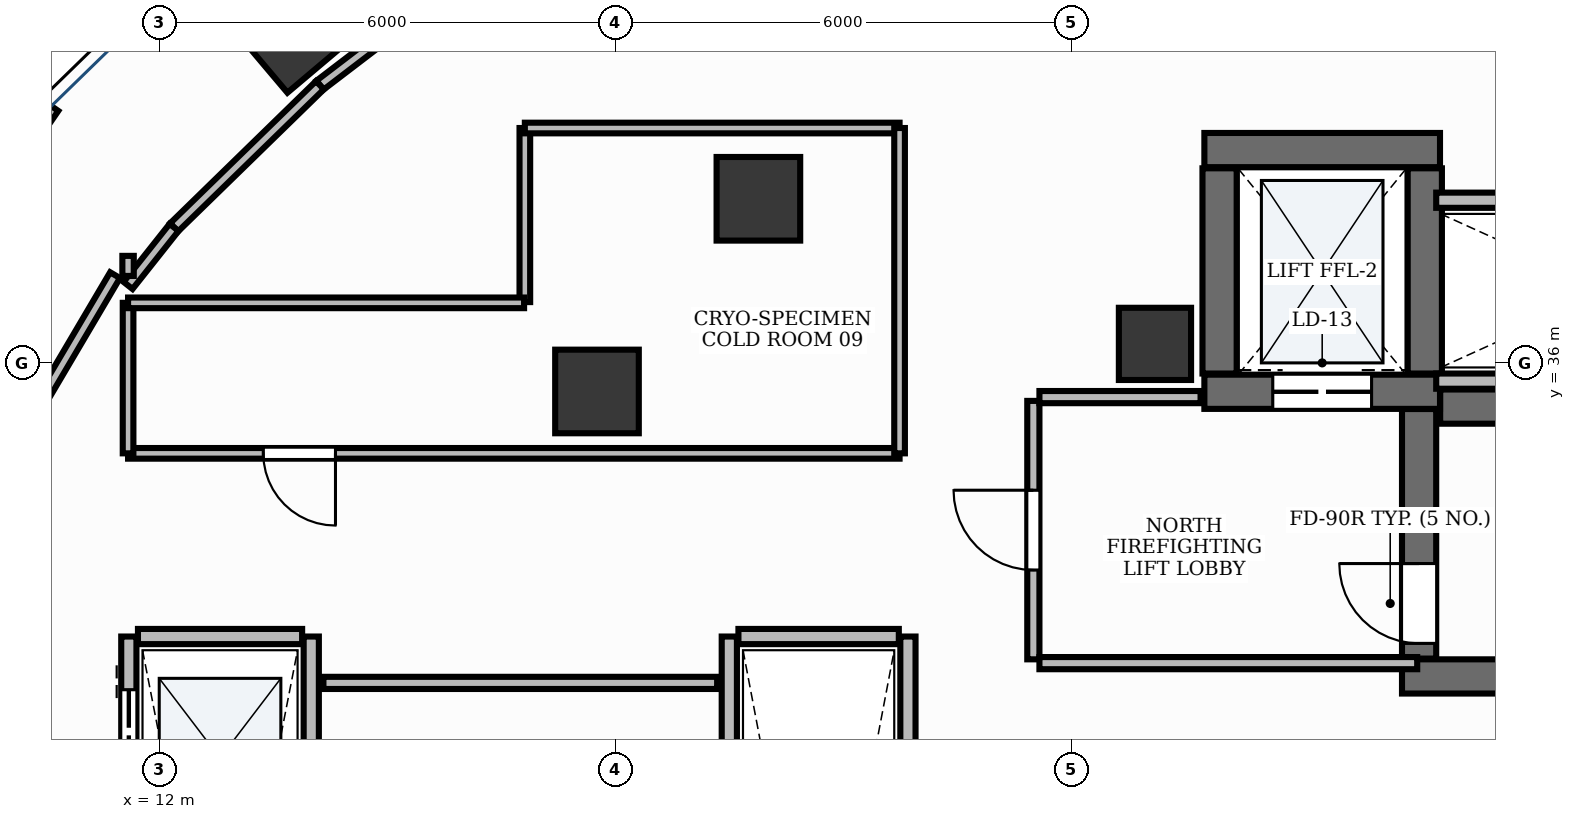
"""IFC4 building model, lengths in metres.
Left out: names, types, materials, properties, quantities, classifications, styles, units other than length and angle.
Written with IfcOpenShell. Run it as: python <this file> out.ifc"""

import sys

from ifc_helpers import new_model, si_unit, direction, frame, frame_2d, origin, origin_2d, place, context, subcontext, project, spatial, rectangle, extrude, element, fill, save


model = new_model("IFC4")
c1 = context("Model", 3, precision=1e-05, world=origin(), true_north=direction((0.0, 1.0)))
c2 = subcontext(c1, "Body", "Model", "MODEL_VIEW")
j1 = project(units=[si_unit("LENGTHUNIT", "METRE"), si_unit("PLANEANGLEUNIT", "RADIAN")], contexts=[c1])
p1 = place(None, origin())
s1 = spatial("IfcSite", under=j1, at=p1, CompositionType="ELEMENT")
p2 = place(p1, origin())
s2 = spatial("IfcBuilding", under=s1, at=p2, CompositionType="ELEMENT")
p3 = place(p2, frame((0.0, 0.0, 102.6)))
s3 = spatial("IfcBuildingStorey", under=s2, at=p3, CompositionType="ELEMENT", Elevation=102.6)
p4 = place(p3, frame((28.852, 35.425, 0.0), z_axis=(0.0, 0.0, 1.0), x_axis=(1.0, 0.0, 0.0)))
e1 = element("IfcWall", 1, at=p4, inside=s3, PredefinedType="SHEAR", context=c2, shape_type="SweptSolid", body=[
    extrude(rectangle(XDim=8.248, YDim=0.45, at=frame_2d((4.124, 0.0))), origin(), (0.0, 0.0, 1.0), 3.9),
])
p5 = place(p3, frame((28.35, 31.875, 0.0), z_axis=(0.0, 0.0, 1.0), x_axis=(1.0, 0.0, 0.0)))
e2 = element("IfcWall", 2, at=p5, inside=s3, PredefinedType="SHEAR", context=c2, shape_type="SweptSolid", body=[
    extrude(rectangle(XDim=8.75, YDim=0.45, at=frame_2d((4.375, 0.0))), origin(), (0.0, 0.0, 1.0), 3.9),
])
p6 = place(p3, frame((28.575, 32.11, 0.0), z_axis=(0.0, 0.0, 1.0), x_axis=(0.0, 1.0, 0.0)))
e3 = element("IfcWall", 3, at=p6, inside=s3, PredefinedType="SHEAR", context=c2, shape_type="SweptSolid", body=[
    extrude(rectangle(XDim=3.283, YDim=0.45, at=frame_2d((1.642, 0.0))), origin(), (0.0, 0.0, 1.0), 3.9),
])
p7 = place(p6, frame((0.2, 0.0, 0.0)))
e4 = element("IfcOpeningElement", 4, at=p7, cuts=e3, PredefinedType="OPENING", context=c2, shape_type="SweptSolid", body=[
    extrude(rectangle(XDim=1.05, YDim=2.15, at=frame_2d((0.525, 1.075))), frame((0.0, 0.24, 0.0), z_axis=(0.0, -1.0, 0.0), x_axis=(1.0, 0.0, 0.0)), (0.0, 0.0, 1.0), 0.48),
])
p8 = place(p3, frame((25.75, 38.8, 0.0), z_axis=(0.0, 0.0, 1.0), x_axis=(1.0, 0.0, 0.0)))
e5 = element("IfcWall", 5, at=p8, inside=s3, PredefinedType="SHEAR", context=c2, shape_type="SweptSolid", body=[
    extrude(rectangle(XDim=3.1, YDim=0.45, at=frame_2d((1.55, 0.0))), origin(), (0.0, 0.0, 1.0), 3.9),
])
p9 = place(p3, frame((25.75, 35.62, 0.0), z_axis=(0.0, 0.0, 1.0), x_axis=(1.0, 0.0, 0.0)))
e6 = element("IfcWall", 6, at=p9, inside=s3, PredefinedType="SHEAR", context=c2, shape_type="SweptSolid", body=[
    extrude(rectangle(XDim=3.1, YDim=0.45, at=frame_2d((1.55, 0.0))), origin(), (0.0, 0.0, 1.0), 3.9),
])
p10 = place(p9, frame((0.9, 0.0, 0.0)))
e7 = element("IfcOpeningElement", 7, at=p10, cuts=e6, PredefinedType="OPENING", context=c2, shape_type="SweptSolid", body=[
    extrude(rectangle(XDim=1.3, YDim=2.2, at=frame_2d((0.65, 1.1))), frame((0.0, 0.24, 0.0), z_axis=(0.0, -1.0, 0.0), x_axis=(1.0, 0.0, 0.0)), (0.0, 0.0, 1.0), 0.48),
])
for number, where, z_axis, x_axis in (
    (8, (25.95, 35.86, 0.0), (0.0, 0.0, 1.0), (0.0, 1.0, 0.0)),
    (9, (28.65, 35.86, 0.0), (0.0, 0.0, 1.0), (0.0, 1.0, 0.0)),
):
    element("IfcWall", number, at=place(p3, frame(where, z_axis=z_axis, x_axis=x_axis)), inside=s3, PredefinedType="SHEAR", context=c2, shape_type="SweptSolid", body=[
        extrude(rectangle(XDim=2.7, YDim=0.45, at=frame_2d((1.35, 0.0))), origin(), (0.0, 0.0, 1.0), 3.9),
    ])
p11 = place(p3, frame((25.1, 36.25, -0.0), z_axis=(0.0, 0.0, 1.0), x_axis=(1.0, 0.0, 0.0)))
e10 = element("IfcColumn", 10, at=p11, inside=s3, PredefinedType="PILASTER", context=c2, shape_type="SweptSolid", body=[
    extrude(rectangle(XDim=0.95, YDim=0.95, at=origin_2d()), origin(), (0.0, 0.0, 1.0), 3.901),
])
p12 = place(p3, frame((13.758, 40.4, -0.0), z_axis=(0.0, 0.0, 1.0), x_axis=(0.764246456939, 0.644924300253, 0.0)))
e11 = element("IfcColumn", 11, at=p12, inside=s3, PredefinedType="COLUMN", context=c2, shape_type="SweptSolid", body=[
    extrude(rectangle(XDim=1.2, YDim=1.2, at=origin_2d()), origin(), (0.0, 0.0, 1.0), 3.901),
])
for number, where, z_axis, x_axis in (
    (12, (19.883, 38.159, -0.0), (0.0, 0.0, 1.0), (1.0, 0.0, 0.0)),
    (13, (17.759, 35.624, -0.0), (0.0, 0.0, 1.0), (1.0, 0.0, 0.0)),
):
    element("IfcColumn", number, at=place(p3, frame(where, z_axis=z_axis, x_axis=x_axis)), inside=s3, PredefinedType="COLUMN", context=c2, shape_type="SweptSolid", body=[
        extrude(rectangle(XDim=1.1, YDim=1.1, at=origin_2d()), origin(), (0.0, 0.0, 1.0), 3.901),
    ])
p13 = place(p3, frame((10.548, 39.4, 0.0), z_axis=(0.0, 0.0, 1.0), x_axis=(-0.566825798999, -0.823837674296, 0.0)))
e14 = element("IfcWall", 14, at=p13, inside=s3, PredefinedType="STANDARD", context=c2, shape_type="SweptSolid", body=[
    extrude(rectangle(XDim=5.826, YDim=0.3, at=frame_2d((2.913, 0.0))), origin(), (0.0, 0.0, 1.0), 3.9),
])
p14 = place(p3, frame((11.6, 21.6, 0.0), z_axis=(0.0, 0.0, 1.0), x_axis=(0.0, 1.0, 0.0)))
e15 = element("IfcWall", 15, at=p14, inside=s3, PredefinedType="PARTITIONING", context=c2, shape_type="SweptSolid", body=[
    extrude(rectangle(XDim=10.8, YDim=0.2, at=frame_2d((5.4, 0.0))), origin(), (0.0, 0.0, 1.0), 2.91),
])
p15 = place(p14, frame((0.9, 0.0, 0.0)))
e16 = element("IfcOpeningElement", 16, at=p15, cuts=e15, PredefinedType="OPENING", context=c2, shape_type="SweptSolid", body=[
    extrude(rectangle(XDim=1.1, YDim=2.2, at=frame_2d((0.55, 1.1))), frame((0.0, 0.115, 0.0), z_axis=(0.0, -1.0, 0.0), x_axis=(1.0, 0.0, 0.0)), (0.0, 0.0, 1.0), 0.23),
])
p16 = place(p14, frame((3.6, 0.0, 0.0)))
e17 = element("IfcOpeningElement", 17, at=p16, cuts=e15, PredefinedType="OPENING", context=c2, shape_type="SweptSolid", body=[
    extrude(rectangle(XDim=1.1, YDim=2.2, at=frame_2d((0.55, 1.1))), frame((0.0, 0.115, 0.0), z_axis=(0.0, -1.0, 0.0), x_axis=(1.0, 0.0, 0.0)), (0.0, 0.0, 1.0), 0.23),
])
p17 = place(p14, frame((6.3, 0.0, 0.0)))
e18 = element("IfcOpeningElement", 18, at=p17, cuts=e15, PredefinedType="OPENING", context=c2, shape_type="SweptSolid", body=[
    extrude(rectangle(XDim=1.1, YDim=2.2, at=frame_2d((0.55, 1.1))), frame((0.0, 0.115, 0.0), z_axis=(0.0, -1.0, 0.0), x_axis=(1.0, 0.0, 0.0)), (0.0, 0.0, 1.0), 0.23),
])
p18 = place(p14, frame((9.0, 0.0, 0.0)))
e19 = element("IfcOpeningElement", 19, at=p18, cuts=e15, PredefinedType="OPENING", context=c2, shape_type="SweptSolid", body=[
    extrude(rectangle(XDim=1.1, YDim=2.2, at=frame_2d((0.55, 1.1))), frame((0.0, 0.115, 0.0), z_axis=(0.0, -1.0, 0.0), x_axis=(1.0, 0.0, 0.0)), (0.0, 0.0, 1.0), 0.23),
])
p19 = place(p3, frame((14.0, 21.6, 0.0), z_axis=(0.0, 0.0, 1.0), x_axis=(0.0, 1.0, 0.0)))
e20 = element("IfcWall", 20, at=p19, inside=s3, PredefinedType="PARTITIONING", context=c2, shape_type="SweptSolid", body=[
    extrude(rectangle(XDim=10.8, YDim=0.2, at=frame_2d((5.4, 0.0))), origin(), (0.0, 0.0, 1.0), 2.91),
])
p20 = place(p3, frame((11.72, 32.4, 0.0), z_axis=(0.0, 0.0, 1.0), x_axis=(1.0, 0.0, 0.0)))
e21 = element("IfcWall", 21, at=p20, inside=s3, PredefinedType="PARTITIONING", context=c2, shape_type="SweptSolid", body=[
    extrude(rectangle(XDim=2.16, YDim=0.2, at=frame_2d((1.08, 0.0))), origin(), (0.0, 0.0, 1.0), 2.91),
])
for number, where, z_axis, x_axis in (
    (22, (19.5, 21.6, 0.0), (0.0, 0.0, 1.0), (0.0, 1.0, 0.0)),
    (23, (21.85, 21.6, 0.0), (0.0, 0.0, 1.0), (0.0, 1.0, 0.0)),
):
    element("IfcWall", number, at=place(p3, frame(where, z_axis=z_axis, x_axis=x_axis)), inside=s3, PredefinedType="PARTITIONING", context=c2, shape_type="SweptSolid", body=[
        extrude(rectangle(XDim=10.8, YDim=0.2, at=frame_2d((5.4, 0.0))), origin(), (0.0, 0.0, 1.0), 2.91),
    ])
p21 = place(p3, frame((19.62, 32.4, 0.0), z_axis=(0.0, 0.0, 1.0), x_axis=(1.0, 0.0, 0.0)))
e24 = element("IfcWall", 24, at=p21, inside=s3, PredefinedType="PARTITIONING", context=c2, shape_type="SweptSolid", body=[
    extrude(rectangle(XDim=2.11, YDim=0.2, at=frame_2d((1.055, 0.0))), origin(), (0.0, 0.0, 1.0), 2.91),
])
for number, where, z_axis, x_axis in (
    (25, (28.8, 35.76, 0.0), (0.0, 0.0, 1.0), (1.0, 0.0, 0.0)),
    (26, (28.8, 38.14, 0.0), (0.0, 0.0, 1.0), (1.0, 0.0, 0.0)),
):
    element("IfcWall", number, at=place(p3, frame(where, z_axis=z_axis, x_axis=x_axis)), inside=s3, PredefinedType="PARTITIONING", context=c2, shape_type="SweptSolid", body=[
        extrude(rectangle(XDim=4.57, YDim=0.2, at=frame_2d((2.285, 0.0))), origin(), (0.0, 0.0, 1.0), 2.91),
    ])
p22 = place(p3, frame((23.5, 32.1, 0.0), z_axis=(0.0, 0.0, 1.0), x_axis=(0.0, 1.0, 0.0)))
e27 = element("IfcWall", 27, at=p22, inside=s3, PredefinedType="PARTITIONING", context=c2, shape_type="SweptSolid", body=[
    extrude(rectangle(XDim=3.4, YDim=0.16, at=frame_2d((1.7, 0.0))), origin(), (0.0, 0.0, 1.0), 2.91),
])
p23 = place(p22, frame((1.175, 0.0, 0.0)))
e28 = element("IfcOpeningElement", 28, at=p23, cuts=e27, PredefinedType="OPENING", context=c2, shape_type="SweptSolid", body=[
    extrude(rectangle(XDim=1.05, YDim=2.15, at=frame_2d((0.525, 1.075))), frame((0.0, 0.095, 0.0), z_axis=(0.0, -1.0, 0.0), x_axis=(1.0, 0.0, 0.0)), (0.0, 0.0, 1.0), 0.19),
])
p24 = place(p3, frame((23.58, 32.05, 0.0), z_axis=(0.0, 0.0, 1.0), x_axis=(1.0, 0.0, 0.0)))
e29 = element("IfcWall", 29, at=p24, inside=s3, PredefinedType="PARTITIONING", context=c2, shape_type="SweptSolid", body=[
    extrude(rectangle(XDim=4.97, YDim=0.16, at=frame_2d((2.485, 0.0))), origin(), (0.0, 0.0, 1.0), 2.91),
])
p25 = place(p3, frame((23.58, 35.55, 0.0), z_axis=(0.0, 0.0, 1.0), x_axis=(1.0, 0.0, 0.0)))
e30 = element("IfcWall", 30, at=p25, inside=s3, PredefinedType="PARTITIONING", context=c2, shape_type="SweptSolid", body=[
    extrude(rectangle(XDim=2.12, YDim=0.16, at=frame_2d((1.06, 0.0))), origin(), (0.0, 0.0, 1.0), 2.91),
])
p26 = place(p3, frame((21.74, 34.81, 0.0), z_axis=(0.0, 0.0, 1.0), x_axis=(-1.0, 0.0, 0.0)))
e31 = element("IfcWall", 31, at=p26, inside=s3, PredefinedType="PARTITIONING", context=c2, shape_type="SweptSolid", body=[
    extrude(rectangle(XDim=10.15, YDim=0.14, at=frame_2d((5.075, 0.0))), origin(), (0.0, 0.0, 1.0), 2.91),
])
p27 = place(p26, frame((7.421, 0.0, 0.0)))
e32 = element("IfcOpeningElement", 32, at=p27, cuts=e31, PredefinedType="OPENING", context=c2, shape_type="SweptSolid", body=[
    extrude(rectangle(XDim=0.95, YDim=2.15, at=frame_2d((0.475, 1.075))), frame((0.0, 0.085, 0.0), z_axis=(0.0, -1.0, 0.0), x_axis=(1.0, 0.0, 0.0)), (0.0, 0.0, 1.0), 0.17),
])
p28 = place(p3, frame((16.339, 41.354, 0.0), z_axis=(0.0, 0.0, 1.0), x_axis=(-0.794513779695, -0.607246122981, 0.0)))
e33 = element("IfcWall", 33, at=p28, inside=s3, PredefinedType="PARTITIONING", context=c2, shape_type="SweptSolid", body=[
    extrude(rectangle(XDim=2.799, YDim=0.15, at=frame_2d((1.399, 0.0))), origin(), (0.0, 0.0, 1.0), 2.91),
])
p29 = place(p3, frame((14.114, 39.653, 0.0), z_axis=(0.0, 0.0, 1.0), x_axis=(-0.716161838398, -0.697934252794, 0.0)))
e34 = element("IfcWall", 34, at=p29, inside=s3, PredefinedType="PARTITIONING", context=c2, shape_type="SweptSolid", body=[
    extrude(rectangle(XDim=2.679, YDim=0.15, at=frame_2d((1.339, 0.0))), origin(), (0.0, 0.0, 1.0), 2.91),
])
p30 = place(p3, frame((12.195, 37.782, 0.0), z_axis=(0.0, 0.0, 1.0), x_axis=(-0.621081637991, -0.783745876513, 0.0)))
e35 = element("IfcWall", 35, at=p30, inside=s3, PredefinedType="PARTITIONING", context=c2, shape_type="SweptSolid", body=[
    extrude(rectangle(XDim=0.974, YDim=0.15, at=frame_2d((0.487, 0.0))), origin(), (0.0, 0.0, 1.0), 2.91),
])
p31 = place(p3, frame((11.59, 37.144, 0.0), z_axis=(0.0, 0.0, 1.0), x_axis=(0.0, 1.0, 0.0)))
e36 = element("IfcWall", 36, at=p31, inside=s3, PredefinedType="PARTITIONING", context=c2, shape_type="SweptSolid", body=[
    extrude(rectangle(XDim=0.264, YDim=0.15, at=frame_2d((0.132, 0.0))), origin(), (0.0, 0.0, 1.0), 2.91),
])
p32 = place(p3, frame((11.419, 37.154, 0.0), z_axis=(0.0, 0.0, 1.0), x_axis=(-0.508183269016, -0.861248956511, 0.0)))
e37 = element("IfcWall", 37, at=p32, inside=s3, PredefinedType="PARTITIONING", context=c2, shape_type="SweptSolid", body=[
    extrude(rectangle(XDim=4.053, YDim=0.15, at=frame_2d((2.026, 0.0))), origin(), (0.0, 0.0, 1.0), 2.91),
])
p33 = place(p3, frame((16.81, 36.8, 0.0), z_axis=(0.0, 0.0, 1.0), x_axis=(0.0, 1.0, 0.0)))
e38 = element("IfcWall", 38, at=p33, inside=s3, PredefinedType="PARTITIONING", context=c2, shape_type="SweptSolid", body=[
    extrude(rectangle(XDim=2.29, YDim=0.14, at=frame_2d((1.145, 0.0))), origin(), (0.0, 0.0, 1.0), 2.91),
])
p34 = place(p3, frame((16.81, 39.09, 0.0), z_axis=(0.0, 0.0, 1.0), x_axis=(1.0, 0.0, 0.0)))
e39 = element("IfcWall", 39, at=p34, inside=s3, PredefinedType="PARTITIONING", context=c2, shape_type="SweptSolid", body=[
    extrude(rectangle(XDim=4.93, YDim=0.14, at=frame_2d((2.465, 0.0))), origin(), (0.0, 0.0, 1.0), 2.91),
])
p35 = place(p3, frame((21.74, 39.09, 0.0), z_axis=(0.0, 0.0, 1.0), x_axis=(0.0, -1.0, 0.0)))
e40 = element("IfcWall", 40, at=p35, inside=s3, PredefinedType="PARTITIONING", context=c2, shape_type="SweptSolid", body=[
    extrude(rectangle(XDim=4.28, YDim=0.14, at=frame_2d((2.14, 0.0))), origin(), (0.0, 0.0, 1.0), 2.91),
])
p36 = place(p3, frame((11.59, 34.81, 0.0), z_axis=(0.0, 0.0, 1.0), x_axis=(0.0, 1.0, 0.0)))
e41 = element("IfcWall", 41, at=p36, inside=s3, PredefinedType="PARTITIONING", context=c2, shape_type="SweptSolid", body=[
    extrude(rectangle(XDim=1.98, YDim=0.14, at=frame_2d((0.99, 0.0))), origin(), (0.0, 0.0, 1.0), 2.91),
])
p37 = place(p3, frame((11.59, 36.79, 0.0), z_axis=(0.0, 0.0, 1.0), x_axis=(1.0, 0.0, 0.0)))
e42 = element("IfcWall", 42, at=p37, inside=s3, PredefinedType="PARTITIONING", context=c2, shape_type="SweptSolid", body=[
    extrude(rectangle(XDim=5.21, YDim=0.14, at=frame_2d((2.605, 0.0))), origin(), (0.0, 0.0, 1.0), 2.91),
])
p38 = place(p3, frame((14.16, 31.79, 0.0), z_axis=(0.0, 0.0, 1.0), x_axis=(1.0, 0.0, 0.0)))
e43 = element("IfcWall", 43, at=p38, inside=s3, PredefinedType="PARTITIONING", context=c2, shape_type="SweptSolid", body=[
    extrude(rectangle(XDim=5.18, YDim=0.16, at=frame_2d((2.59, 0.0))), origin(), (0.0, 0.0, 1.0), 2.91),
])
p39 = place(p7, origin())
e44 = element("IfcDoor", 44, at=p39, inside=s3, OperationType="SINGLE_SWING_RIGHT", PredefinedType="DOOR", context=c2, shape_type="SweptSolid", body=[
    extrude(rectangle(XDim=1.05, YDim=2.15, at=frame_2d((0.525, 1.075))), frame((0.0, 0.025, 0.0), z_axis=(0.0, -1.0, 0.0), x_axis=(1.0, 0.0, 0.0)), (0.0, 0.0, 1.0), 0.05),
])
fill(e4, e44)
p40 = place(p18, origin())
e45 = element("IfcDoor", 45, at=p40, inside=s3, OperationType="DOUBLE_DOOR_SLIDING", PredefinedType="DOOR", context=c2, shape_type="SweptSolid", body=[
    extrude(rectangle(XDim=1.1, YDim=2.2, at=frame_2d((0.55, 1.1))), frame((0.0, 0.025, 0.0), z_axis=(0.0, -1.0, 0.0), x_axis=(1.0, 0.0, 0.0)), (0.0, 0.0, 1.0), 0.05),
])
fill(e19, e45)
p41 = place(p10, origin())
e46 = element("IfcDoor", 46, at=p41, inside=s3, OperationType="DOUBLE_DOOR_SLIDING", PredefinedType="DOOR", context=c2, shape_type="SweptSolid", body=[
    extrude(rectangle(XDim=1.3, YDim=2.2, at=frame_2d((0.65, 1.1))), frame((0.0, 0.025, 0.0), z_axis=(0.0, -1.0, 0.0), x_axis=(1.0, 0.0, 0.0)), (0.0, 0.0, 1.0), 0.05),
])
fill(e7, e46)
p42 = place(p23, origin())
e47 = element("IfcDoor", 47, at=p42, inside=s3, OperationType="SINGLE_SWING_RIGHT", PredefinedType="DOOR", context=c2, shape_type="SweptSolid", body=[
    extrude(rectangle(XDim=1.05, YDim=2.15, at=frame_2d((0.525, 1.075))), frame((0.0, 0.025, 0.0), z_axis=(0.0, -1.0, 0.0), x_axis=(1.0, 0.0, 0.0)), (0.0, 0.0, 1.0), 0.05),
])
fill(e28, e47)
p43 = place(p27, origin())
e48 = element("IfcDoor", 48, at=p43, inside=s3, OperationType="SINGLE_SWING_LEFT", PredefinedType="DOOR", context=c2, shape_type="SweptSolid", body=[
    extrude(rectangle(XDim=0.95, YDim=2.15, at=frame_2d((0.475, 1.075))), frame((0.0, 0.025, 0.0), z_axis=(0.0, -1.0, 0.0), x_axis=(1.0, 0.0, 0.0)), (0.0, 0.0, 1.0), 0.05),
])
fill(e32, e48)
save(model, sys.argv[1])
